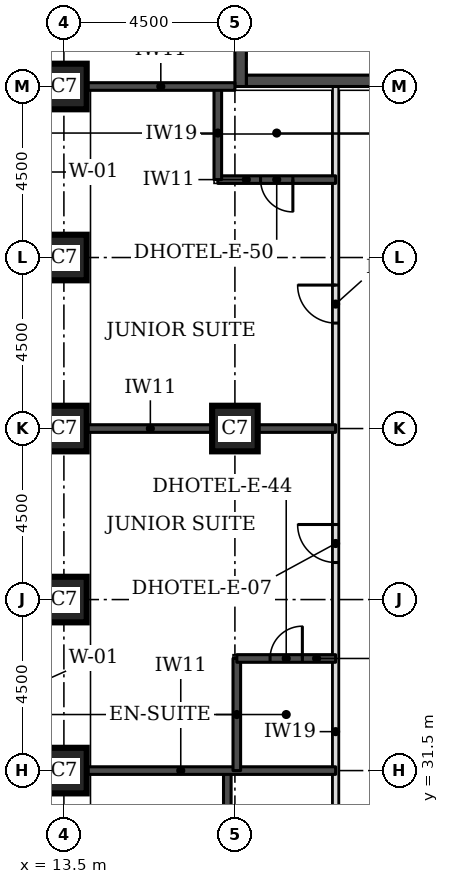
"""IFC4 building model, lengths in metres.
Left out: names, types, materials, properties, quantities, classifications, styles, units other than length and angle.
Written with IfcOpenShell. Run it as: python <this file> out.ifc"""

import sys

from ifc_helpers import new_model, si_unit, direction, frame, frame_2d, origin, origin_2d, place, context, subcontext, project, spatial, rectangle, extrude, element, fill, save


model = new_model("IFC4")
c1 = context("Model", 3, precision=1e-05, world=origin(), true_north=direction((0.0, 1.0)))
c2 = subcontext(c1, "Body", "Model", "MODEL_VIEW")
j1 = project(units=[si_unit("LENGTHUNIT", "METRE"), si_unit("PLANEANGLEUNIT", "RADIAN")], contexts=[c1])
p1 = place(None, origin())
s1 = spatial("IfcSite", under=j1, at=p1, CompositionType="ELEMENT")
p2 = place(p1, origin())
s2 = spatial("IfcBuilding", under=s1, at=p2, CompositionType="ELEMENT")
p3 = place(p2, frame((0.0, 0.0, 62.7)))
s3 = spatial("IfcBuildingStorey", under=s2, at=p3, CompositionType="ELEMENT", Elevation=62.7)
for number, where, z_axis, x_axis in (
    (1, (13.5, 31.5, 0.0), (0.0, 0.0, 1.0), (1.0, 0.0, 0.0)),
    (2, (13.5, 36.0, 0.0), (0.0, 0.0, 1.0), (1.0, 0.0, 0.0)),
    (3, (13.5, 40.5, 0.0), (0.0, 0.0, 1.0), (1.0, 0.0, 0.0)),
    (4, (18.0, 40.5, 0.0), (0.0, 0.0, 1.0), (1.0, 0.0, 0.0)),
    (5, (13.5, 45.0, 0.0), (0.0, 0.0, 1.0), (1.0, 0.0, 0.0)),
    (6, (13.5, 49.5, 0.0), (0.0, 0.0, 1.0), (1.0, 0.0, 0.0)),
):
    element("IfcColumn", number, at=place(p3, frame(where, z_axis=z_axis, x_axis=x_axis)), inside=s3, PredefinedType="COLUMN", context=c2, shape_type="SweptSolid", body=[
        extrude(rectangle(XDim=1.2, YDim=1.2, at=origin_2d()), origin(), (0.0, 0.0, 1.0), 3.3),
    ])
p4 = place(p3, frame((18.3, 49.65, 0.0), z_axis=(0.0, 0.0, 1.0), x_axis=(1.0, 0.0, 0.0)))
e7 = element("IfcWall", 7, at=p4, inside=s3, PredefinedType="SHEAR", context=c2, shape_type="SweptSolid", body=[
    extrude(rectangle(XDim=8.4, YDim=0.3, at=frame_2d((4.2, 0.0))), origin(), (0.0, 0.0, 1.0), 3.3),
])
p5 = place(p3, frame((18.15, 49.5, 0.0), z_axis=(0.0, 0.0, 1.0), x_axis=(0.0, 1.0, 0.0)))
e8 = element("IfcWall", 8, at=p5, inside=s3, PredefinedType="SHEAR", context=c2, shape_type="SweptSolid", body=[
    extrude(rectangle(XDim=9.0, YDim=0.3, at=frame_2d((4.5, 0.0))), origin(), (0.0, 0.0, 1.0), 3.3),
])
p6 = place(p3, frame((20.65, 25.15, 0.0), z_axis=(0.0, 0.0, 1.0), x_axis=(0.0, 1.0, 0.0)))
e9 = element("IfcWall", 9, at=p6, inside=s3, PredefinedType="PARTITIONING", context=c2, shape_type="SweptSolid", body=[
    extrude(rectangle(XDim=24.35, YDim=0.15, at=frame_2d((12.175, 0.0))), origin(), (0.0, 0.0, 1.0), 3.08),
])
p7 = place(p6, frame((0.447, 0.0, 0.0)))
e10 = element("IfcOpeningElement", 10, at=p7, cuts=e9, PredefinedType="OPENING", context=c2, shape_type="SweptSolid", body=[
    extrude(rectangle(XDim=1.0, YDim=2.1, at=frame_2d((0.5, 1.05))), frame((0.0, 0.085, 0.0), z_axis=(0.0, -1.0, 0.0), x_axis=(1.0, 0.0, 0.0)), (0.0, 0.0, 1.0), 0.17),
])
p8 = place(p6, frame((11.825, 0.0, 0.0)))
e11 = element("IfcOpeningElement", 11, at=p8, cuts=e9, PredefinedType="OPENING", context=c2, shape_type="SweptSolid", body=[
    extrude(rectangle(XDim=1.0, YDim=2.1, at=frame_2d((0.5, 1.05))), frame((0.0, 0.085, 0.0), z_axis=(0.0, -1.0, 0.0), x_axis=(1.0, 0.0, 0.0)), (0.0, 0.0, 1.0), 0.17),
])
p9 = place(p6, frame((18.125, 0.0, 0.0)))
e12 = element("IfcOpeningElement", 12, at=p9, cuts=e9, PredefinedType="OPENING", context=c2, shape_type="SweptSolid", body=[
    extrude(rectangle(XDim=1.0, YDim=2.1, at=frame_2d((0.5, 1.05))), frame((0.0, 0.085, 0.0), z_axis=(0.0, -1.0, 0.0), x_axis=(1.0, 0.0, 0.0)), (0.0, 0.0, 1.0), 0.17),
])
p10 = place(p3, frame((17.8, 29.05, 0.0), z_axis=(0.0, 0.0, 1.0), x_axis=(0.0, 1.0, 0.0)))
e13 = element("IfcWall", 13, at=p10, inside=s3, PredefinedType="SOLIDWALL", context=c2, shape_type="SweptSolid", body=[
    extrude(rectangle(XDim=2.45, YDim=0.2, at=frame_2d((1.225, 0.0))), origin(), (0.0, 0.0, 1.0), 3.08),
])
p11 = place(p3, frame((14.1, 31.5, 0.0), z_axis=(0.0, 0.0, 1.0), x_axis=(1.0, 0.0, 0.0)))
e14 = element("IfcWall", 14, at=p11, inside=s3, PredefinedType="SOLIDWALL", context=c2, shape_type="SweptSolid", body=[
    extrude(rectangle(XDim=6.55, YDim=0.2, at=frame_2d((3.275, 0.0))), origin(), (0.0, 0.0, 1.0), 3.08),
])
p12 = place(p3, frame((18.05, 31.5, 0.0), z_axis=(0.0, 0.0, 1.0), x_axis=(0.0, 1.0, 0.0)))
e15 = element("IfcWall", 15, at=p12, inside=s3, PredefinedType="SOLIDWALL", context=c2, shape_type="SweptSolid", body=[
    extrude(rectangle(XDim=2.95, YDim=0.2, at=frame_2d((1.475, 0.0))), origin(), (0.0, 0.0, 1.0), 3.08),
])
p13 = place(p3, frame((18.05, 34.45, 0.0), z_axis=(0.0, 0.0, 1.0), x_axis=(1.0, 0.0, 0.0)))
e16 = element("IfcWall", 16, at=p13, inside=s3, PredefinedType="SOLIDWALL", context=c2, shape_type="SweptSolid", body=[
    extrude(rectangle(XDim=2.6, YDim=0.2, at=frame_2d((1.3, 0.0))), origin(), (0.0, 0.0, 1.0), 3.08),
])
p14 = place(p13, frame((0.875, 0.0, 0.0)))
e17 = element("IfcOpeningElement", 17, at=p14, cuts=e16, PredefinedType="OPENING", context=c2, shape_type="SweptSolid", body=[
    extrude(rectangle(XDim=0.85, YDim=2.1, at=frame_2d((0.425, 1.05))), frame((0.0, 0.11, 0.0), z_axis=(0.0, -1.0, 0.0), x_axis=(1.0, 0.0, 0.0)), (0.0, 0.0, 1.0), 0.22),
])
p15 = place(p3, frame((14.1, 40.5, 0.0), z_axis=(0.0, 0.0, 1.0), x_axis=(1.0, 0.0, 0.0)))
e18 = element("IfcWall", 18, at=p15, inside=s3, PredefinedType="SOLIDWALL", context=c2, shape_type="SweptSolid", body=[
    extrude(rectangle(XDim=6.55, YDim=0.2, at=frame_2d((3.275, 0.0))), origin(), (0.0, 0.0, 1.0), 3.08),
])
p16 = place(p3, frame((17.55, 47.05, 0.0), z_axis=(0.0, 0.0, 1.0), x_axis=(1.0, 0.0, 0.0)))
e19 = element("IfcWall", 19, at=p16, inside=s3, PredefinedType="SOLIDWALL", context=c2, shape_type="SweptSolid", body=[
    extrude(rectangle(XDim=3.1, YDim=0.2, at=frame_2d((1.55, 0.0))), origin(), (0.0, 0.0, 1.0), 3.08),
])
p17 = place(p16, frame((1.125, 0.0, 0.0)))
e20 = element("IfcOpeningElement", 20, at=p17, cuts=e19, PredefinedType="OPENING", context=c2, shape_type="SweptSolid", body=[
    extrude(rectangle(XDim=0.85, YDim=2.1, at=frame_2d((0.425, 1.05))), frame((0.0, 0.11, 0.0), z_axis=(0.0, -1.0, 0.0), x_axis=(1.0, 0.0, 0.0)), (0.0, 0.0, 1.0), 0.22),
])
p18 = place(p3, frame((17.55, 47.05, 0.0), z_axis=(0.0, 0.0, 1.0), x_axis=(0.0, 1.0, 0.0)))
e21 = element("IfcWall", 21, at=p18, inside=s3, PredefinedType="SOLIDWALL", context=c2, shape_type="SweptSolid", body=[
    extrude(rectangle(XDim=2.45, YDim=0.2, at=frame_2d((1.225, 0.0))), origin(), (0.0, 0.0, 1.0), 3.08),
])
p19 = place(p3, frame((14.1, 49.5, 0.0), z_axis=(0.0, 0.0, 1.0), x_axis=(1.0, 0.0, 0.0)))
e22 = element("IfcWall", 22, at=p19, inside=s3, PredefinedType="SOLIDWALL", context=c2, shape_type="SweptSolid", body=[
    extrude(rectangle(XDim=3.9, YDim=0.2, at=frame_2d((1.95, 0.0))), origin(), (0.0, 0.0, 1.0), 3.08),
])
p20 = place(p8, origin())
e23 = element("IfcDoor", 23, at=p20, inside=s3, OperationType="SINGLE_SWING_RIGHT", PredefinedType="DOOR", context=c2, shape_type="SweptSolid", body=[
    extrude(rectangle(XDim=1.0, YDim=2.1, at=frame_2d((0.5, 1.05))), frame((0.0, 0.025, 0.0), z_axis=(0.0, -1.0, 0.0), x_axis=(1.0, 0.0, 0.0)), (0.0, 0.0, 1.0), 0.05),
])
fill(e11, e23)
p21 = place(p14, origin())
e24 = element("IfcDoor", 24, at=p21, inside=s3, OperationType="SINGLE_SWING_RIGHT", PredefinedType="DOOR", context=c2, shape_type="SweptSolid", body=[
    extrude(rectangle(XDim=0.85, YDim=2.1, at=frame_2d((0.425, 1.05))), frame((0.0, 0.025, 0.0), z_axis=(0.0, -1.0, 0.0), x_axis=(1.0, 0.0, 0.0)), (0.0, 0.0, 1.0), 0.05),
])
fill(e17, e24)
p22 = place(p9, origin())
e25 = element("IfcDoor", 25, at=p22, inside=s3, OperationType="SINGLE_SWING_RIGHT", PredefinedType="DOOR", context=c2, shape_type="SweptSolid", body=[
    extrude(rectangle(XDim=1.0, YDim=2.1, at=frame_2d((0.5, 1.05))), frame((0.0, 0.025, 0.0), z_axis=(0.0, -1.0, 0.0), x_axis=(1.0, 0.0, 0.0)), (0.0, 0.0, 1.0), 0.05),
])
fill(e12, e25)
p23 = place(p17, frame((0.85, 0.0, 0.0), z_axis=(0.0, 0.0, 1.0), x_axis=(-1.0, 0.0, 0.0)))
e26 = element("IfcDoor", 26, at=p23, inside=s3, OperationType="SINGLE_SWING_LEFT", PredefinedType="DOOR", context=c2, shape_type="SweptSolid", body=[
    extrude(rectangle(XDim=0.85, YDim=2.1, at=frame_2d((0.425, 1.05))), frame((0.0, 0.025, 0.0), z_axis=(0.0, -1.0, 0.0), x_axis=(1.0, 0.0, 0.0)), (0.0, 0.0, 1.0), 0.05),
])
fill(e20, e26)
save(model, sys.argv[1])
